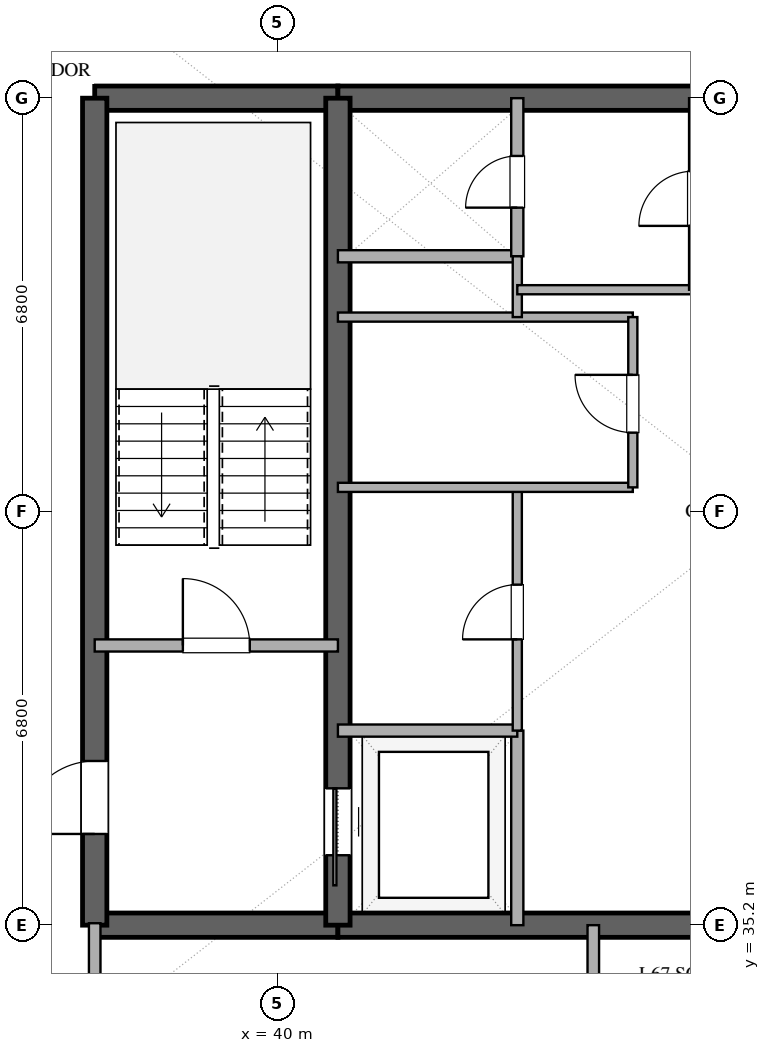
"""IFC4 building model, lengths in metres.
Left out: names, types, materials, properties, quantities, classifications, styles, units other than length and angle.
Written with IfcOpenShell. Run it as: python <this file> out.ifc"""

import sys

from ifc_helpers import new_model, si_unit, direction, frame, frame_2d, origin, place, context, subcontext, project, spatial, rectangle, extrude, element, fill, save


model = new_model("IFC4")
c1 = context("Model", 3, precision=1e-05, world=origin(), true_north=direction((0.0, 1.0)))
c2 = subcontext(c1, "Body", "Model", "MODEL_VIEW")
j1 = project(units=[si_unit("LENGTHUNIT", "METRE"), si_unit("PLANEANGLEUNIT", "RADIAN")], contexts=[c1])
p1 = place(None, origin())
s1 = spatial("IfcSite", under=j1, at=p1, CompositionType="ELEMENT")
p2 = place(p1, origin())
s2 = spatial("IfcBuilding", under=s1, at=p2, CompositionType="ELEMENT")
p3 = place(p2, frame((0.0, 0.0, 262.2)))
s3 = spatial("IfcBuildingStorey", under=s2, at=p3, CompositionType="ELEMENT", Elevation=262.2)
p4 = place(p3, frame((37.0, 35.2, 0.0), z_axis=(0.0, 0.0, 1.0), x_axis=(1.0, 0.0, 0.0)))
e1 = element("IfcWall", 1, at=p4, inside=s3, PredefinedType="SHEAR", context=c2, shape_type="SweptSolid", body=[
    extrude(rectangle(XDim=4.0, YDim=0.4, at=frame_2d((2.0, 0.0))), origin(), (0.0, 0.0, 1.0), 3.37),
])
p5 = place(p3, frame((41.0, 35.2, 0.0), z_axis=(0.0, 0.0, 1.0), x_axis=(1.0, 0.0, 0.0)))
e2 = element("IfcWall", 2, at=p5, inside=s3, PredefinedType="SHEAR", context=c2, shape_type="SweptSolid", body=[
    extrude(rectangle(XDim=14.0, YDim=0.4, at=frame_2d((7.0, 0.0))), origin(), (0.0, 0.0, 1.0), 3.37),
])
p6 = place(p5, frame((6.1, 0.0, 0.0)))
e3 = element("IfcOpeningElement", 3, at=p6, cuts=e2, PredefinedType="OPENING", context=c2, shape_type="SweptSolid", body=[
    extrude(rectangle(XDim=1.8, YDim=2.25, at=frame_2d((0.9, 1.125))), frame((0.0, 0.21, 0.0), z_axis=(0.0, -1.0, 0.0), x_axis=(1.0, 0.0, 0.0)), (0.0, 0.0, 1.0), 0.42),
])
p7 = place(p3, frame((37.0, 48.8, 0.0), z_axis=(0.0, 0.0, 1.0), x_axis=(1.0, 0.0, 0.0)))
e4 = element("IfcWall", 4, at=p7, inside=s3, PredefinedType="SHEAR", context=c2, shape_type="SweptSolid", body=[
    extrude(rectangle(XDim=4.0, YDim=0.4, at=frame_2d((2.0, 0.0))), origin(), (0.0, 0.0, 1.0), 3.37),
])
p8 = place(p3, frame((41.0, 48.8, 0.0), z_axis=(0.0, 0.0, 1.0), x_axis=(1.0, 0.0, 0.0)))
e5 = element("IfcWall", 5, at=p8, inside=s3, PredefinedType="SHEAR", context=c2, shape_type="SweptSolid", body=[
    extrude(rectangle(XDim=14.0, YDim=0.4, at=frame_2d((7.0, 0.0))), origin(), (0.0, 0.0, 1.0), 3.37),
])
p9 = place(p8, frame((6.1, 0.0, 0.0)))
e6 = element("IfcOpeningElement", 6, at=p9, cuts=e5, PredefinedType="OPENING", context=c2, shape_type="SweptSolid", body=[
    extrude(rectangle(XDim=1.8, YDim=2.25, at=frame_2d((0.9, 1.125))), frame((0.0, 0.21, 0.0), z_axis=(0.0, -1.0, 0.0), x_axis=(1.0, 0.0, 0.0)), (0.0, 0.0, 1.0), 0.42),
])
p10 = place(p3, frame((37.0, 35.2, 0.0), z_axis=(0.0, 0.0, 1.0), x_axis=(0.0, 1.0, 0.0)))
e7 = element("IfcWall", 7, at=p10, inside=s3, PredefinedType="SHEAR", context=c2, shape_type="SweptSolid", body=[
    extrude(rectangle(XDim=13.6, YDim=0.4, at=frame_2d((6.8, 0.0))), origin(), (0.0, 0.0, 1.0), 3.37),
])
p11 = place(p10, frame((1.5, 0.0, 0.0)))
e8 = element("IfcOpeningElement", 8, at=p11, cuts=e7, PredefinedType="OPENING", context=c2, shape_type="SweptSolid", body=[
    extrude(rectangle(XDim=1.2, YDim=2.15, at=frame_2d((0.6, 1.075))), frame((0.0, 0.21, 0.0), z_axis=(0.0, -1.0, 0.0), x_axis=(1.0, 0.0, 0.0)), (0.0, 0.0, 1.0), 0.42),
])
p12 = place(p3, frame((41.0, 35.2, 0.0), z_axis=(0.0, 0.0, 1.0), x_axis=(0.0, 1.0, 0.0)))
e9 = element("IfcWall", 9, at=p12, inside=s3, PredefinedType="SHEAR", context=c2, shape_type="SweptSolid", body=[
    extrude(rectangle(XDim=13.6, YDim=0.4, at=frame_2d((6.8, 0.0))), origin(), (0.0, 0.0, 1.0), 3.37),
])
p13 = place(p12, frame((1.15, 0.0, 0.0)))
e10 = element("IfcOpeningElement", 10, at=p13, cuts=e9, PredefinedType="OPENING", context=c2, shape_type="SweptSolid", body=[
    extrude(rectangle(XDim=1.1, YDim=2.2, at=frame_2d((0.55, 1.1))), frame((0.0, 0.21, 0.0), z_axis=(0.0, -1.0, 0.0), x_axis=(1.0, 0.0, 0.0)), (0.0, 0.0, 1.0), 0.42),
])
p14 = place(p3, frame((37.0, 39.8, 0.0), z_axis=(0.0, 0.0, 1.0), x_axis=(1.0, 0.0, 0.0)))
e11 = element("IfcWall", 11, at=p14, inside=s3, PredefinedType="SOLIDWALL", context=c2, shape_type="SweptSolid", body=[
    extrude(rectangle(XDim=4.0, YDim=0.2, at=frame_2d((2.0, 0.0))), origin(), (0.0, 0.0, 1.0), 2.73),
])
p15 = place(p14, frame((1.45, 0.0, 0.0)))
e12 = element("IfcOpeningElement", 12, at=p15, cuts=e11, PredefinedType="OPENING", context=c2, shape_type="SweptSolid", body=[
    extrude(rectangle(XDim=1.1, YDim=2.15, at=frame_2d((0.55, 1.075))), frame((0.0, 0.11, 0.0), z_axis=(0.0, -1.0, 0.0), x_axis=(1.0, 0.0, 0.0)), (0.0, 0.0, 1.0), 0.22),
])
p16 = place(p3, frame((43.95, 35.2, 0.0), z_axis=(0.0, 0.0, 1.0), x_axis=(0.0, 1.0, 0.0)))
e13 = element("IfcWall", 13, at=p16, inside=s3, PredefinedType="SOLIDWALL", context=c2, shape_type="SweptSolid", body=[
    extrude(rectangle(XDim=3.2, YDim=0.2, at=frame_2d((1.6, 0.0))), origin(), (0.0, 0.0, 1.0), 2.73),
])
for number, where, z_axis, x_axis in (
    (14, (41.0, 38.4, 0.0), (0.0, 0.0, 1.0), (1.0, 0.0, 0.0)),
    (15, (41.0, 46.2, 0.0), (0.0, 0.0, 1.0), (1.0, 0.0, 0.0)),
):
    element("IfcWall", number, at=place(p3, frame(where, z_axis=z_axis, x_axis=x_axis)), inside=s3, PredefinedType="SOLIDWALL", context=c2, shape_type="SweptSolid", body=[
        extrude(rectangle(XDim=2.95, YDim=0.2, at=frame_2d((1.475, 0.0))), origin(), (0.0, 0.0, 1.0), 2.73),
    ])
p17 = place(p3, frame((43.95, 46.2, 0.0), z_axis=(0.0, 0.0, 1.0), x_axis=(0.0, 1.0, 0.0)))
e16 = element("IfcWall", 16, at=p17, inside=s3, PredefinedType="SOLIDWALL", context=c2, shape_type="SweptSolid", body=[
    extrude(rectangle(XDim=2.6, YDim=0.2, at=frame_2d((1.3, 0.0))), origin(), (0.0, 0.0, 1.0), 2.73),
])
p18 = place(p17, frame((0.8, 0.0, 0.0)))
e17 = element("IfcOpeningElement", 17, at=p18, cuts=e16, PredefinedType="OPENING", context=c2, shape_type="SweptSolid", body=[
    extrude(rectangle(XDim=0.85, YDim=2.15, at=frame_2d((0.425, 1.075))), frame((0.0, 0.11, 0.0), z_axis=(0.0, -1.0, 0.0), x_axis=(1.0, 0.0, 0.0)), (0.0, 0.0, 1.0), 0.22),
])
p19 = place(p3, frame((43.95, 38.4, 0.0), z_axis=(0.0, 0.0, 1.0), x_axis=(0.0, 1.0, 0.0)))
e18 = element("IfcWall", 18, at=p19, inside=s3, PredefinedType="PARTITIONING", context=c2, shape_type="SweptSolid", body=[
    extrude(rectangle(XDim=4.0, YDim=0.15, at=frame_2d((2.0, 0.0))), origin(), (0.0, 0.0, 1.0), 2.73),
])
p20 = place(p19, frame((1.5, 0.0, 0.0)))
e19 = element("IfcOpeningElement", 19, at=p20, cuts=e18, PredefinedType="OPENING", context=c2, shape_type="SweptSolid", body=[
    extrude(rectangle(XDim=0.9, YDim=2.15, at=frame_2d((0.45, 1.075))), frame((0.0, 0.085, 0.0), z_axis=(0.0, -1.0, 0.0), x_axis=(1.0, 0.0, 0.0)), (0.0, 0.0, 1.0), 0.17),
])
for number, where, z_axis, x_axis in (
    (20, (41.0, 42.4, 0.0), (0.0, 0.0, 1.0), (1.0, 0.0, 0.0)),
    (21, (41.0, 45.2, 0.0), (0.0, 0.0, 1.0), (1.0, 0.0, 0.0)),
):
    element("IfcWall", number, at=place(p3, frame(where, z_axis=z_axis, x_axis=x_axis)), inside=s3, PredefinedType="PARTITIONING", context=c2, shape_type="SweptSolid", body=[
        extrude(rectangle(XDim=4.85, YDim=0.15, at=frame_2d((2.425, 0.0))), origin(), (0.0, 0.0, 1.0), 2.73),
    ])
p21 = place(p3, frame((43.95, 45.2, 0.0), z_axis=(0.0, 0.0, 1.0), x_axis=(0.0, 1.0, 0.0)))
e22 = element("IfcWall", 22, at=p21, inside=s3, PredefinedType="PARTITIONING", context=c2, shape_type="SweptSolid", body=[
    extrude(rectangle(XDim=1.0, YDim=0.15, at=frame_2d((0.5, 0.0))), origin(), (0.0, 0.0, 1.0), 2.73),
])
p22 = place(p3, frame((45.85, 42.4, 0.0), z_axis=(0.0, 0.0, 1.0), x_axis=(0.0, 1.0, 0.0)))
e23 = element("IfcWall", 23, at=p22, inside=s3, PredefinedType="PARTITIONING", context=c2, shape_type="SweptSolid", body=[
    extrude(rectangle(XDim=2.8, YDim=0.15, at=frame_2d((1.4, 0.0))), origin(), (0.0, 0.0, 1.0), 2.73),
])
p23 = place(p22, frame((0.9, 0.0, 0.0)))
e24 = element("IfcOpeningElement", 24, at=p23, cuts=e23, PredefinedType="OPENING", context=c2, shape_type="SweptSolid", body=[
    extrude(rectangle(XDim=0.95, YDim=2.15, at=frame_2d((0.475, 1.075))), frame((0.0, 0.085, 0.0), z_axis=(0.0, -1.0, 0.0), x_axis=(1.0, 0.0, 0.0)), (0.0, 0.0, 1.0), 0.17),
])
p24 = place(p3, frame((43.95, 45.65, 0.0), z_axis=(0.0, 0.0, 1.0), x_axis=(1.0, 0.0, 0.0)))
e25 = element("IfcWall", 25, at=p24, inside=s3, PredefinedType="PARTITIONING", context=c2, shape_type="SweptSolid", body=[
    extrude(rectangle(XDim=2.9, YDim=0.15, at=frame_2d((1.45, 0.0))), origin(), (0.0, 0.0, 1.0), 2.73),
])
p25 = place(p3, frame((46.85, 45.65, 0.0), z_axis=(0.0, 0.0, 1.0), x_axis=(0.0, 1.0, 0.0)))
e26 = element("IfcWall", 26, at=p25, inside=s3, PredefinedType="PARTITIONING", context=c2, shape_type="SweptSolid", body=[
    extrude(rectangle(XDim=3.15, YDim=0.15, at=frame_2d((1.575, 0.0))), origin(), (0.0, 0.0, 1.0), 2.73),
])
p26 = place(p25, frame((1.05, 0.0, 0.0)))
e27 = element("IfcOpeningElement", 27, at=p26, cuts=e26, PredefinedType="OPENING", context=c2, shape_type="SweptSolid", body=[
    extrude(rectangle(XDim=0.9, YDim=2.15, at=frame_2d((0.45, 1.075))), frame((0.0, 0.085, 0.0), z_axis=(0.0, -1.0, 0.0), x_axis=(1.0, 0.0, 0.0)), (0.0, 0.0, 1.0), 0.17),
])
p27 = place(p3, frame((45.2, 35.2, 0.0), z_axis=(0.0, 0.0, 1.0), x_axis=(0.0, -1.0, 0.0)))
e28 = element("IfcWall", 28, at=p27, inside=s3, PredefinedType="PARTITIONING", context=c2, shape_type="SweptSolid", body=[
    extrude(rectangle(XDim=2.1, YDim=0.19, at=frame_2d((1.05, 0.0))), origin(), (0.0, 0.0, 1.0), 2.73),
])
p28 = place(p3, frame((37.0, 35.232, 0.0), z_axis=(0.0, 0.0, 1.0), x_axis=(0.0, -1.0, 0.0)))
e29 = element("IfcWall", 29, at=p28, inside=s3, PredefinedType="PARTITIONING", context=c2, shape_type="SweptSolid", body=[
    extrude(rectangle(XDim=1.232, YDim=0.19, at=frame_2d((0.616, 0.0))), origin(), (0.0, 0.0, 1.0), 2.73),
])
p29 = place(p13, origin())
e30 = element("IfcDoor", 30, at=p29, inside=s3, OperationType="SLIDING_TO_LEFT", PredefinedType="DOOR", context=c2, shape_type="SweptSolid", body=[
    extrude(rectangle(XDim=1.1, YDim=2.2, at=frame_2d((0.55, 1.1))), frame((0.0, 0.025, 0.0), z_axis=(0.0, -1.0, 0.0), x_axis=(1.0, 0.0, 0.0)), (0.0, 0.0, 1.0), 0.05),
])
fill(e10, e30)
p30 = place(p11, origin())
e31 = element("IfcDoor", 31, at=p30, inside=s3, OperationType="SINGLE_SWING_LEFT", PredefinedType="DOOR", context=c2, shape_type="SweptSolid", body=[
    extrude(rectangle(XDim=1.2, YDim=2.15, at=frame_2d((0.6, 1.075))), frame((0.0, 0.025, 0.0), z_axis=(0.0, -1.0, 0.0), x_axis=(1.0, 0.0, 0.0)), (0.0, 0.0, 1.0), 0.05),
])
fill(e8, e31)
p31 = place(p15, origin())
e32 = element("IfcDoor", 32, at=p31, inside=s3, OperationType="SINGLE_SWING_LEFT", PredefinedType="DOOR", context=c2, shape_type="SweptSolid", body=[
    extrude(rectangle(XDim=1.1, YDim=2.15, at=frame_2d((0.55, 1.075))), frame((0.0, 0.025, 0.0), z_axis=(0.0, -1.0, 0.0), x_axis=(1.0, 0.0, 0.0)), (0.0, 0.0, 1.0), 0.05),
])
fill(e12, e32)
p32 = place(p18, origin())
e33 = element("IfcDoor", 33, at=p32, inside=s3, OperationType="SINGLE_SWING_LEFT", PredefinedType="DOOR", context=c2, shape_type="SweptSolid", body=[
    extrude(rectangle(XDim=0.85, YDim=2.15, at=frame_2d((0.425, 1.075))), frame((0.0, 0.025, 0.0), z_axis=(0.0, -1.0, 0.0), x_axis=(1.0, 0.0, 0.0)), (0.0, 0.0, 1.0), 0.05),
])
fill(e17, e33)
p33 = place(p20, origin())
e34 = element("IfcDoor", 34, at=p33, inside=s3, OperationType="SINGLE_SWING_LEFT", PredefinedType="DOOR", context=c2, shape_type="SweptSolid", body=[
    extrude(rectangle(XDim=0.9, YDim=2.15, at=frame_2d((0.45, 1.075))), frame((0.0, 0.025, 0.0), z_axis=(0.0, -1.0, 0.0), x_axis=(1.0, 0.0, 0.0)), (0.0, 0.0, 1.0), 0.05),
])
fill(e19, e34)
p34 = place(p23, origin())
e35 = element("IfcDoor", 35, at=p34, inside=s3, OperationType="SINGLE_SWING_RIGHT", PredefinedType="DOOR", context=c2, shape_type="SweptSolid", body=[
    extrude(rectangle(XDim=0.95, YDim=2.15, at=frame_2d((0.475, 1.075))), frame((0.0, 0.025, 0.0), z_axis=(0.0, -1.0, 0.0), x_axis=(1.0, 0.0, 0.0)), (0.0, 0.0, 1.0), 0.05),
])
fill(e24, e35)
save(model, sys.argv[1])
